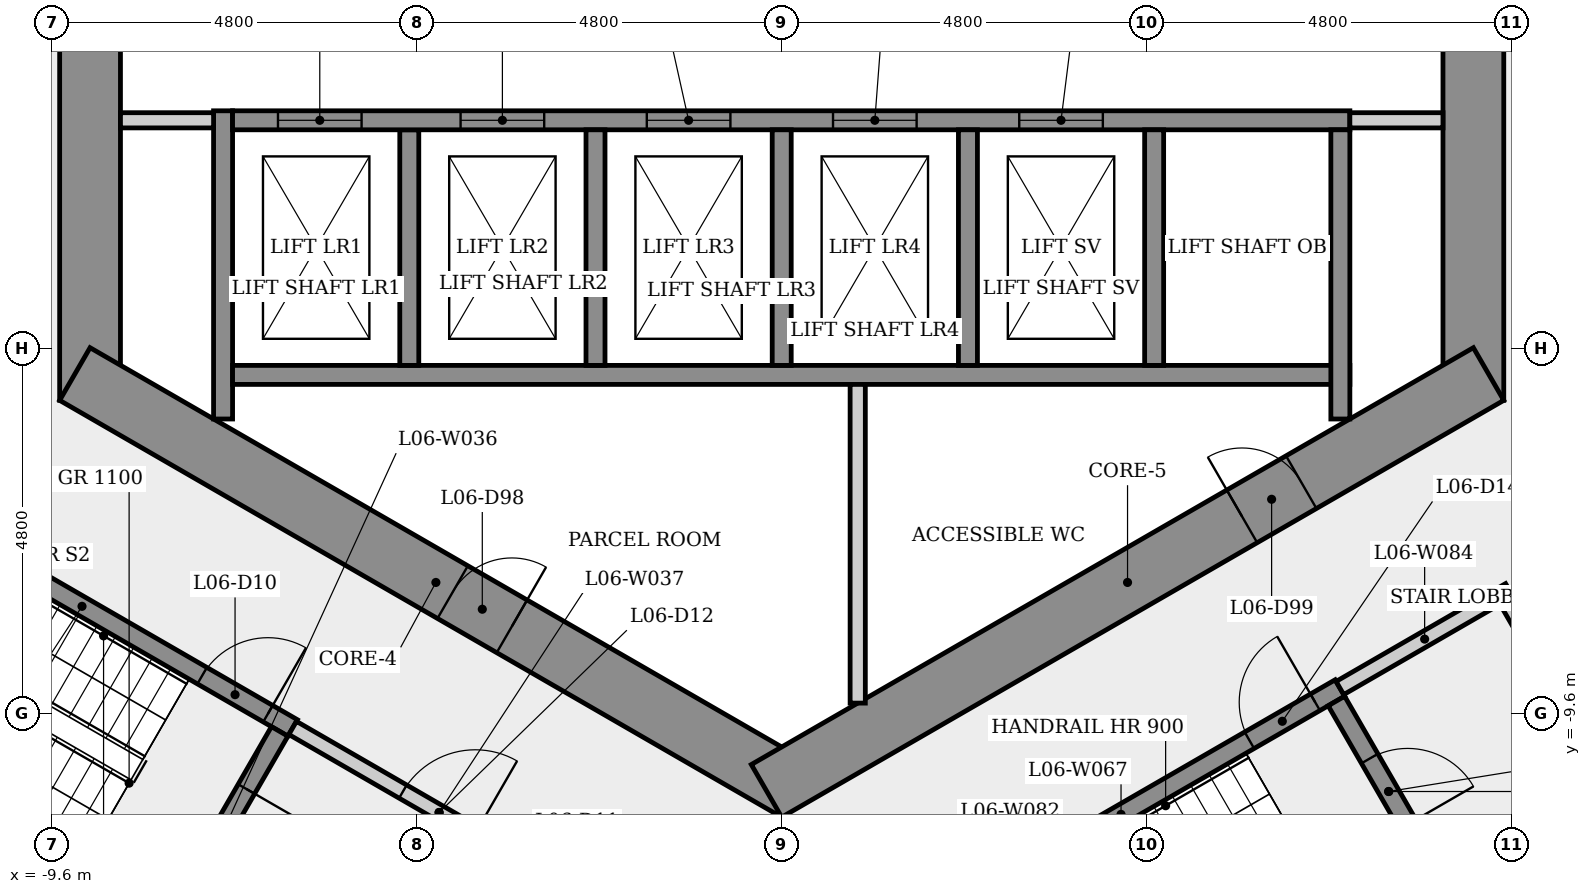
"""IFC4 building model, lengths in metres.
Left out: names, types, materials, properties, quantities, classifications, styles, units other than length and angle.
Written with IfcOpenShell. Run it as: python <this file> out.ifc"""

import sys

from ifc_helpers import new_model, si_unit, direction, frame, frame_2d, origin, place, context, subcontext, project, spatial, rectangle, extrude, element, fill, save


model = new_model("IFC4")
c1 = context("Model", 3, precision=1e-05, world=origin(), true_north=direction((0.0, 1.0)))
c2 = subcontext(c1, "Body", "Model", "MODEL_VIEW")
j1 = project(units=[si_unit("LENGTHUNIT", "METRE"), si_unit("PLANEANGLEUNIT", "RADIAN")], contexts=[c1])
p1 = place(None, origin())
s1 = spatial("IfcSite", under=j1, at=p1, CompositionType="ELEMENT")
p2 = place(p1, origin())
s2 = spatial("IfcBuilding", under=s1, at=p2, CompositionType="ELEMENT")
p3 = place(p2, frame((0.0, 0.0, 28.9)))
s3 = spatial("IfcBuildingStorey", under=s2, at=p3, CompositionType="ELEMENT", Elevation=28.9)
p4 = place(p3, frame((9.1, -5.485, 0.0), z_axis=(0.0, 0.0, 1.0), x_axis=(0.0, 1.0, 0.0)))
e1 = element("IfcWall", 1, at=p4, inside=s3, PredefinedType="SHEAR", context=c2, shape_type="SweptSolid", body=[
    extrude(rectangle(XDim=10.97, YDim=0.8, at=frame_2d((5.485, 0.0))), origin(), (0.0, 0.0, 1.0), 3.4),
])
p5 = place(p4, frame((4.685, 0.0, 0.0)))
e2 = element("IfcOpeningElement", 2, at=p5, cuts=e1, PredefinedType="OPENING", context=c2, shape_type="SweptSolid", body=[
    extrude(rectangle(XDim=1.6, YDim=2.1, at=frame_2d((0.8, 1.05))), frame((0.0, 0.41, 0.0), z_axis=(0.0, -1.0, 0.0), x_axis=(1.0, 0.0, 0.0)), (0.0, 0.0, 1.0), 0.82),
])
p6 = place(p3, frame((-9.1, 5.485, 0.0), z_axis=(0.0, 0.0, 1.0), x_axis=(0.0, -1.0, 0.0)))
e3 = element("IfcWall", 3, at=p6, inside=s3, PredefinedType="SHEAR", context=c2, shape_type="SweptSolid", body=[
    extrude(rectangle(XDim=10.97, YDim=0.8, at=frame_2d((5.485, 0.0))), origin(), (0.0, 0.0, 1.0), 3.4),
])
p7 = place(p6, frame((4.685, 0.0, 0.0)))
e4 = element("IfcOpeningElement", 4, at=p7, cuts=e3, PredefinedType="OPENING", context=c2, shape_type="SweptSolid", body=[
    extrude(rectangle(XDim=1.6, YDim=2.1, at=frame_2d((0.8, 1.05))), frame((0.0, 0.41, 0.0), z_axis=(0.0, -1.0, 0.0), x_axis=(1.0, 0.0, 0.0)), (0.0, 0.0, 1.0), 0.82),
])
p8 = place(p3, frame((-9.3, -5.138, 0.0), z_axis=(0.0, 0.0, 1.0), x_axis=(0.866023993627, -0.500002442456, 0.0)))
e5 = element("IfcWall", 5, at=p8, inside=s3, PredefinedType="SHEAR", context=c2, shape_type="SweptSolid", body=[
    extrude(rectangle(XDim=10.97, YDim=0.8, at=frame_2d((5.485, 0.0))), origin(), (0.0, 0.0, 1.0), 3.4),
])
p9 = place(p8, frame((5.74, 0.0, 0.0)))
e6 = element("IfcOpeningElement", 6, at=p9, cuts=e5, PredefinedType="OPENING", context=c2, shape_type="SweptSolid", body=[
    extrude(rectangle(XDim=0.9, YDim=2.1, at=frame_2d((0.45, 1.05))), frame((0.0, 0.41, 0.0), z_axis=(0.0, -1.0, 0.0), x_axis=(1.0, 0.0, 0.0)), (0.0, 0.0, 1.0), 0.82),
])
p10 = place(p3, frame((-0.2, -10.623, 0.0), z_axis=(0.0, 0.0, 1.0), x_axis=(0.866023993627, 0.500002442456, 0.0)))
e7 = element("IfcWall", 7, at=p10, inside=s3, PredefinedType="SHEAR", context=c2, shape_type="SweptSolid", body=[
    extrude(rectangle(XDim=10.97, YDim=0.8, at=frame_2d((5.485, 0.0))), origin(), (0.0, 0.0, 1.0), 3.4),
])
p11 = place(p10, frame((7.224, 0.0, 0.0)))
e8 = element("IfcOpeningElement", 8, at=p11, cuts=e7, PredefinedType="OPENING", context=c2, shape_type="SweptSolid", body=[
    extrude(rectangle(XDim=0.9, YDim=2.1, at=frame_2d((0.45, 1.05))), frame((0.0, 0.41, 0.0), z_axis=(0.0, -1.0, 0.0), x_axis=(1.0, 0.0, 0.0)), (0.0, 0.0, 1.0), 0.82),
])
p12 = place(p3, frame((-11.977, -6.595, 0.0), z_axis=(0.0, 0.0, 1.0), x_axis=(0.866025499775, -0.499999833739, 0.0)))
e9 = element("IfcWall", 9, at=p12, inside=s3, PredefinedType="SHEAR", context=c2, shape_type="SweptSolid", body=[
    extrude(rectangle(XDim=6.4, YDim=0.25, at=frame_2d((3.2, 0.0))), origin(), (0.0, 0.0, 1.0), 3.05),
])
p13 = place(p12, frame((5.025, 0.0, 0.0)))
e10 = element("IfcOpeningElement", 10, at=p13, cuts=e9, PredefinedType="OPENING", context=c2, shape_type="SweptSolid", body=[
    extrude(rectangle(XDim=1.0, YDim=2.1, at=frame_2d((0.5, 1.05))), frame((0.0, 0.135, 0.0), z_axis=(0.0, -1.0, 0.0), x_axis=(1.0, 0.0, 0.0)), (0.0, 0.0, 1.0), 0.27),
])
p14 = place(p3, frame((-7.935, -12.393, 0.0), z_axis=(0.0, 0.0, 1.0), x_axis=(-0.866025499775, 0.499999833739, 0.0)))
e11 = element("IfcWall", 11, at=p14, inside=s3, PredefinedType="SHEAR", context=c2, shape_type="SweptSolid", body=[
    extrude(rectangle(XDim=6.4, YDim=0.25, at=frame_2d((3.2, 0.0))), origin(), (0.0, 0.0, 1.0), 3.05),
])
p15 = place(p3, frame((-7.35, -5.73, 0.0), z_axis=(0.0, 0.0, 1.0), x_axis=(0.0, 1.0, 0.0)))
e12 = element("IfcWall", 12, at=p15, inside=s3, PredefinedType="SHEAR", context=c2, shape_type="SweptSolid", body=[
    extrude(rectangle(XDim=4.055, YDim=0.25, at=frame_2d((2.028, 0.0))), origin(), (0.0, 0.0, 1.0), 3.05),
])
p16 = place(p3, frame((-7.475, -1.8, 0.0), z_axis=(0.0, 0.0, 1.0), x_axis=(-1.0, 0.0, 0.0)))
e13 = element("IfcWall", 13, at=p16, inside=s3, PredefinedType="PARTITIONING", context=c2, shape_type="SweptSolid", body=[
    extrude(rectangle(XDim=1.225, YDim=0.2, at=frame_2d((0.613, 0.0))), origin(), (0.0, 0.0, 1.0), 3.05),
])
p17 = place(p3, frame((-6.605, -9.841, 0.0), z_axis=(0.0, 0.0, 1.0), x_axis=(-0.499996545922, -0.866027397988, 0.0)))
e14 = element("IfcWall", 14, at=p17, inside=s3, PredefinedType="SHEAR", context=c2, shape_type="SweptSolid", body=[
    extrude(rectangle(XDim=2.75, YDim=0.25, at=frame_2d((1.375, 0.0))), origin(), (0.0, 0.0, 1.0), 3.05),
])
p18 = place(p17, frame((0.875, 0.0, 0.0)))
e15 = element("IfcOpeningElement", 15, at=p18, cuts=e14, PredefinedType="OPENING", context=c2, shape_type="SweptSolid", body=[
    extrude(rectangle(XDim=1.0, YDim=2.1, at=frame_2d((0.5, 1.05))), frame((0.0, 0.135, 0.0), z_axis=(0.0, -1.0, 0.0), x_axis=(1.0, 0.0, 0.0)), (0.0, 0.0, 1.0), 0.27),
])
p19 = place(p3, frame((-6.435, -9.795, 0.0), z_axis=(0.0, 0.0, 1.0), x_axis=(0.866012907634, -0.500021643343, 0.0)))
e16 = element("IfcWall", 16, at=p19, inside=s3, PredefinedType="PARTITIONING", context=c2, shape_type="SweptSolid", body=[
    extrude(rectangle(XDim=4.45, YDim=0.2, at=frame_2d((2.225, 0.0))), origin(), (0.0, 0.0, 1.0), 3.05),
])
p20 = place(p19, frame((1.675, 0.0, 0.0)))
e17 = element("IfcOpeningElement", 17, at=p20, cuts=e16, PredefinedType="OPENING", context=c2, shape_type="SweptSolid", body=[
    extrude(rectangle(XDim=1.1, YDim=2.1, at=frame_2d((0.55, 1.05))), frame((0.0, 0.11, 0.0), z_axis=(0.0, -1.0, 0.0), x_axis=(1.0, 0.0, 0.0)), (0.0, 0.0, 1.0), 0.22),
])
p21 = place(p3, frame((-7.225, -5.15, 0.0), z_axis=(0.0, 0.0, 1.0), x_axis=(1.0, 0.0, 0.0)))
e18 = element("IfcWall", 18, at=p21, inside=s3, PredefinedType="SHEAR", context=c2, shape_type="SweptSolid", body=[
    extrude(rectangle(XDim=14.7, YDim=0.25, at=frame_2d((7.35, 0.0))), origin(), (0.0, 0.0, 1.0), 3.05),
])
p22 = place(p3, frame((-4.9, -1.925, 0.0), z_axis=(0.0, 0.0, 1.0), x_axis=(0.0, -1.0, 0.0)))
e19 = element("IfcWall", 19, at=p22, inside=s3, PredefinedType="SHEAR", context=c2, shape_type="SweptSolid", body=[
    extrude(rectangle(XDim=3.1, YDim=0.25, at=frame_2d((1.55, 0.0))), origin(), (0.0, 0.0, 1.0), 3.4),
])
p23 = place(p3, frame((-7.225, -1.8, 0.0), z_axis=(0.0, 0.0, 1.0), x_axis=(1.0, 0.0, 0.0)))
e20 = element("IfcWall", 20, at=p23, inside=s3, PredefinedType="SHEAR", context=c2, shape_type="SweptSolid", body=[
    extrude(rectangle(XDim=14.7, YDim=0.25, at=frame_2d((7.35, 0.0))), origin(), (0.0, 0.0, 1.0), 3.05),
])
p24 = place(p23, frame((0.597, 0.0, 0.0)))
e21 = element("IfcOpeningElement", 21, at=p24, cuts=e20, PredefinedType="OPENING", context=c2, shape_type="SweptSolid", body=[
    extrude(rectangle(XDim=1.1, YDim=2.1, at=frame_2d((0.55, 1.05))), frame((0.0, 0.135, 0.0), z_axis=(0.0, -1.0, 0.0), x_axis=(1.0, 0.0, 0.0)), (0.0, 0.0, 1.0), 0.27),
])
p25 = place(p23, frame((3.0, 0.0, 0.0)))
e22 = element("IfcOpeningElement", 22, at=p25, cuts=e20, PredefinedType="OPENING", context=c2, shape_type="SweptSolid", body=[
    extrude(rectangle(XDim=1.1, YDim=2.1, at=frame_2d((0.55, 1.05))), frame((0.0, 0.135, 0.0), z_axis=(0.0, -1.0, 0.0), x_axis=(1.0, 0.0, 0.0)), (0.0, 0.0, 1.0), 0.27),
])
p26 = place(p23, frame((5.45, 0.0, 0.0)))
e23 = element("IfcOpeningElement", 23, at=p26, cuts=e20, PredefinedType="OPENING", context=c2, shape_type="SweptSolid", body=[
    extrude(rectangle(XDim=1.1, YDim=2.1, at=frame_2d((0.55, 1.05))), frame((0.0, 0.135, 0.0), z_axis=(0.0, -1.0, 0.0), x_axis=(1.0, 0.0, 0.0)), (0.0, 0.0, 1.0), 0.27),
])
p27 = place(p23, frame((7.9, 0.0, 0.0)))
e24 = element("IfcOpeningElement", 24, at=p27, cuts=e20, PredefinedType="OPENING", context=c2, shape_type="SweptSolid", body=[
    extrude(rectangle(XDim=1.1, YDim=2.1, at=frame_2d((0.55, 1.05))), frame((0.0, 0.135, 0.0), z_axis=(0.0, -1.0, 0.0), x_axis=(1.0, 0.0, 0.0)), (0.0, 0.0, 1.0), 0.27),
])
p28 = place(p23, frame((10.35, 0.0, 0.0)))
e25 = element("IfcOpeningElement", 25, at=p28, cuts=e20, PredefinedType="OPENING", context=c2, shape_type="SweptSolid", body=[
    extrude(rectangle(XDim=1.1, YDim=2.1, at=frame_2d((0.55, 1.05))), frame((0.0, 0.135, 0.0), z_axis=(0.0, -1.0, 0.0), x_axis=(1.0, 0.0, 0.0)), (0.0, 0.0, 1.0), 0.27),
])
for number, where, z_axis, x_axis in (
    (26, (-2.45, -1.925, 0.0), (0.0, 0.0, 1.0), (0.0, -1.0, 0.0)),
    (27, (0.0, -1.925, 0.0), (0.0, 0.0, 1.0), (0.0, -1.0, 0.0)),
):
    element("IfcWall", number, at=place(p3, frame(where, z_axis=z_axis, x_axis=x_axis)), inside=s3, PredefinedType="SHEAR", context=c2, shape_type="SweptSolid", body=[
        extrude(rectangle(XDim=3.1, YDim=0.25, at=frame_2d((1.55, 0.0))), origin(), (0.0, 0.0, 1.0), 3.4),
    ])
p29 = place(p3, frame((1.0, -5.275, 0.0), z_axis=(0.0, 0.0, 1.0), x_axis=(0.0, -1.0, 0.0)))
e28 = element("IfcWall", 28, at=p29, inside=s3, PredefinedType="PARTITIONING", context=c2, shape_type="SweptSolid", body=[
    extrude(rectangle(XDim=4.194, YDim=0.2, at=frame_2d((2.097, 0.0))), origin(), (0.0, 0.0, 1.0), 3.05),
])
p30 = place(p3, frame((1.585, -12.595, 0.0), z_axis=(0.0, 0.0, 1.0), x_axis=(0.866036417653, 0.499980922934, 0.0)))
e29 = element("IfcWall", 29, at=p30, inside=s3, PredefinedType="SHEAR", context=c2, shape_type="SweptSolid", body=[
    extrude(rectangle(XDim=6.65, YDim=0.25, at=frame_2d((3.325, 0.0))), origin(), (0.0, 0.0, 1.0), 3.05),
])
p31 = place(p30, frame((5.275, 0.0, 0.0)))
e30 = element("IfcOpeningElement", 30, at=p31, cuts=e29, PredefinedType="OPENING", context=c2, shape_type="SweptSolid", body=[
    extrude(rectangle(XDim=1.0, YDim=2.1, at=frame_2d((0.5, 1.05))), frame((0.0, 0.135, 0.0), z_axis=(0.0, -1.0, 0.0), x_axis=(1.0, 0.0, 0.0)), (0.0, 0.0, 1.0), 0.27),
])
for number, where, z_axis, x_axis in (
    (31, (2.45, -1.925, 0.0), (0.0, 0.0, 1.0), (0.0, -1.0, 0.0)),
    (32, (4.9, -1.925, 0.0), (0.0, 0.0, 1.0), (0.0, -1.0, 0.0)),
):
    element("IfcWall", number, at=place(p3, frame(where, z_axis=z_axis, x_axis=x_axis)), inside=s3, PredefinedType="SHEAR", context=c2, shape_type="SweptSolid", body=[
        extrude(rectangle(XDim=3.1, YDim=0.25, at=frame_2d((1.55, 0.0))), origin(), (0.0, 0.0, 1.0), 3.4),
    ])
p32 = place(p3, frame((7.298, -9.441, 0.0), z_axis=(0.0, 0.0, 1.0), x_axis=(0.500034990121, -0.866005201286, 0.0)))
e33 = element("IfcWall", 33, at=p32, inside=s3, PredefinedType="SHEAR", context=c2, shape_type="SweptSolid", body=[
    extrude(rectangle(XDim=2.75, YDim=0.25, at=frame_2d((1.375, 0.0))), origin(), (0.0, 0.0, 1.0), 3.05),
])
p33 = place(p32, frame((0.875, 0.0, 0.0)))
e34 = element("IfcOpeningElement", 34, at=p33, cuts=e33, PredefinedType="OPENING", context=c2, shape_type="SweptSolid", body=[
    extrude(rectangle(XDim=1.0, YDim=2.1, at=frame_2d((0.5, 1.05))), frame((0.0, 0.135, 0.0), z_axis=(0.0, -1.0, 0.0), x_axis=(1.0, 0.0, 0.0)), (0.0, 0.0, 1.0), 0.27),
])
p34 = place(p3, frame((7.344, -9.27, 0.0), z_axis=(0.0, 0.0, 1.0), x_axis=(0.866005588531, 0.500034319456, 0.0)))
e35 = element("IfcWall", 35, at=p34, inside=s3, PredefinedType="PARTITIONING", context=c2, shape_type="SweptSolid", body=[
    extrude(rectangle(XDim=2.575, YDim=0.2, at=frame_2d((1.288, 0.0))), origin(), (0.0, 0.0, 1.0), 3.05),
])
p35 = place(p3, frame((7.35, -1.925, 0.0), z_axis=(0.0, 0.0, 1.0), x_axis=(0.0, -1.0, 0.0)))
e36 = element("IfcWall", 36, at=p35, inside=s3, PredefinedType="SHEAR", context=c2, shape_type="SweptSolid", body=[
    extrude(rectangle(XDim=3.805, YDim=0.25, at=frame_2d((1.903, 0.0))), origin(), (0.0, 0.0, 1.0), 3.05),
])
p36 = place(p3, frame((8.7, -1.8, 0.0), z_axis=(0.0, 0.0, 1.0), x_axis=(-1.0, 0.0, 0.0)))
e37 = element("IfcWall", 37, at=p36, inside=s3, PredefinedType="PARTITIONING", context=c2, shape_type="SweptSolid", body=[
    extrude(rectangle(XDim=1.225, YDim=0.2, at=frame_2d((0.613, 0.0))), origin(), (0.0, 0.0, 1.0), 3.05),
])
p37 = place(p3, frame((9.537, -8.119, 0.0), z_axis=(0.0, 0.0, 1.0), x_axis=(0.499990139034, -0.866031096941, 0.0)))
e38 = element("IfcWall", 38, at=p37, inside=s3, PredefinedType="PARTITIONING", context=c2, shape_type="SweptSolid", body=[
    extrude(rectangle(XDim=3.0, YDim=0.2, at=frame_2d((1.5, 0.0))), origin(), (0.0, 0.0, 1.0), 3.05),
])
p38 = place(p37, frame((0.935, 0.0, 0.0)))
e39 = element("IfcOpeningElement", 39, at=p38, cuts=e38, PredefinedType="OPENING", context=c2, shape_type="SweptSolid", body=[
    extrude(rectangle(XDim=1.0, YDim=2.1, at=frame_2d((0.5, 1.05))), frame((0.0, 0.11, 0.0), z_axis=(0.0, -1.0, 0.0), x_axis=(1.0, 0.0, 0.0)), (0.0, 0.0, 1.0), 0.22),
])
p39 = place(p3, frame((10.901, -10.681, 0.0), z_axis=(0.0, 0.0, 1.0), x_axis=(-0.866009402589, -0.500027713859, 0.0)))
e40 = element("IfcWall", 40, at=p39, inside=s3, PredefinedType="PARTITIONING", context=c2, shape_type="SweptSolid", body=[
    extrude(rectangle(XDim=2.1, YDim=0.2, at=frame_2d((1.05, 0.0))), origin(), (0.0, 0.0, 1.0), 3.05),
])
p40 = place(p24, origin())
e41 = element("IfcDoor", 41, at=p40, inside=s3, OperationType="SLIDING_TO_LEFT", PredefinedType="DOOR", context=c2, shape_type="SweptSolid", body=[
    extrude(rectangle(XDim=1.1, YDim=2.1, at=frame_2d((0.55, 1.05))), frame((0.0, 0.025, 0.0), z_axis=(0.0, -1.0, 0.0), x_axis=(1.0, 0.0, 0.0)), (0.0, 0.0, 1.0), 0.05),
])
fill(e21, e41)
p41 = place(p25, origin())
e42 = element("IfcDoor", 42, at=p41, inside=s3, OperationType="SLIDING_TO_LEFT", PredefinedType="DOOR", context=c2, shape_type="SweptSolid", body=[
    extrude(rectangle(XDim=1.1, YDim=2.1, at=frame_2d((0.55, 1.05))), frame((0.0, 0.025, 0.0), z_axis=(0.0, -1.0, 0.0), x_axis=(1.0, 0.0, 0.0)), (0.0, 0.0, 1.0), 0.05),
])
fill(e22, e42)
p42 = place(p26, origin())
e43 = element("IfcDoor", 43, at=p42, inside=s3, OperationType="SLIDING_TO_LEFT", PredefinedType="DOOR", context=c2, shape_type="SweptSolid", body=[
    extrude(rectangle(XDim=1.1, YDim=2.1, at=frame_2d((0.55, 1.05))), frame((0.0, 0.025, 0.0), z_axis=(0.0, -1.0, 0.0), x_axis=(1.0, 0.0, 0.0)), (0.0, 0.0, 1.0), 0.05),
])
fill(e23, e43)
p43 = place(p27, origin())
e44 = element("IfcDoor", 44, at=p43, inside=s3, OperationType="SLIDING_TO_LEFT", PredefinedType="DOOR", context=c2, shape_type="SweptSolid", body=[
    extrude(rectangle(XDim=1.1, YDim=2.1, at=frame_2d((0.55, 1.05))), frame((0.0, 0.025, 0.0), z_axis=(0.0, -1.0, 0.0), x_axis=(1.0, 0.0, 0.0)), (0.0, 0.0, 1.0), 0.05),
])
fill(e24, e44)
p44 = place(p28, origin())
e45 = element("IfcDoor", 45, at=p44, inside=s3, OperationType="SLIDING_TO_LEFT", PredefinedType="DOOR", context=c2, shape_type="SweptSolid", body=[
    extrude(rectangle(XDim=1.1, YDim=2.1, at=frame_2d((0.55, 1.05))), frame((0.0, 0.025, 0.0), z_axis=(0.0, -1.0, 0.0), x_axis=(1.0, 0.0, 0.0)), (0.0, 0.0, 1.0), 0.05),
])
fill(e25, e45)
p45 = place(p13, origin())
e46 = element("IfcDoor", 46, at=p45, inside=s3, OperationType="SINGLE_SWING_RIGHT", PredefinedType="DOOR", context=c2, shape_type="SweptSolid", body=[
    extrude(rectangle(XDim=1.0, YDim=2.1, at=frame_2d((0.5, 1.05))), frame((0.0, 0.025, 0.0), z_axis=(0.0, -1.0, 0.0), x_axis=(1.0, 0.0, 0.0)), (0.0, 0.0, 1.0), 0.05),
])
fill(e10, e46)
p46 = place(p18, origin())
e47 = element("IfcDoor", 47, at=p46, inside=s3, OperationType="SINGLE_SWING_LEFT", PredefinedType="DOOR", context=c2, shape_type="SweptSolid", body=[
    extrude(rectangle(XDim=1.0, YDim=2.1, at=frame_2d((0.5, 1.05))), frame((0.0, 0.025, 0.0), z_axis=(0.0, -1.0, 0.0), x_axis=(1.0, 0.0, 0.0)), (0.0, 0.0, 1.0), 0.05),
])
fill(e15, e47)
p47 = place(p20, origin())
e48 = element("IfcDoor", 48, at=p47, inside=s3, OperationType="SINGLE_SWING_RIGHT", PredefinedType="DOOR", context=c2, shape_type="SweptSolid", body=[
    extrude(rectangle(XDim=1.1, YDim=2.1, at=frame_2d((0.55, 1.05))), frame((0.0, 0.025, 0.0), z_axis=(0.0, -1.0, 0.0), x_axis=(1.0, 0.0, 0.0)), (0.0, 0.0, 1.0), 0.05),
])
fill(e17, e48)
p48 = place(p31, origin())
e49 = element("IfcDoor", 49, at=p48, inside=s3, OperationType="SINGLE_SWING_RIGHT", PredefinedType="DOOR", context=c2, shape_type="SweptSolid", body=[
    extrude(rectangle(XDim=1.0, YDim=2.1, at=frame_2d((0.5, 1.05))), frame((0.0, 0.025, 0.0), z_axis=(0.0, -1.0, 0.0), x_axis=(1.0, 0.0, 0.0)), (0.0, 0.0, 1.0), 0.05),
])
fill(e30, e49)
p49 = place(p33, origin())
e50 = element("IfcDoor", 50, at=p49, inside=s3, OperationType="SINGLE_SWING_RIGHT", PredefinedType="DOOR", context=c2, shape_type="SweptSolid", body=[
    extrude(rectangle(XDim=1.0, YDim=2.1, at=frame_2d((0.5, 1.05))), frame((0.0, 0.025, 0.0), z_axis=(0.0, -1.0, 0.0), x_axis=(1.0, 0.0, 0.0)), (0.0, 0.0, 1.0), 0.05),
])
fill(e34, e50)
p50 = place(p9, origin())
e51 = element("IfcDoor", 51, at=p50, inside=s3, OperationType="SINGLE_SWING_RIGHT", PredefinedType="DOOR", context=c2, shape_type="SweptSolid", body=[
    extrude(rectangle(XDim=0.9, YDim=2.1, at=frame_2d((0.45, 1.05))), frame((0.0, 0.025, 0.0), z_axis=(0.0, -1.0, 0.0), x_axis=(1.0, 0.0, 0.0)), (0.0, 0.0, 1.0), 0.05),
])
fill(e6, e51)
p51 = place(p11, origin())
e52 = element("IfcDoor", 52, at=p51, inside=s3, OperationType="SINGLE_SWING_LEFT", PredefinedType="DOOR", context=c2, shape_type="SweptSolid", body=[
    extrude(rectangle(XDim=0.9, YDim=2.1, at=frame_2d((0.45, 1.05))), frame((0.0, 0.025, 0.0), z_axis=(0.0, -1.0, 0.0), x_axis=(1.0, 0.0, 0.0)), (0.0, 0.0, 1.0), 0.05),
])
fill(e8, e52)
save(model, sys.argv[1])
